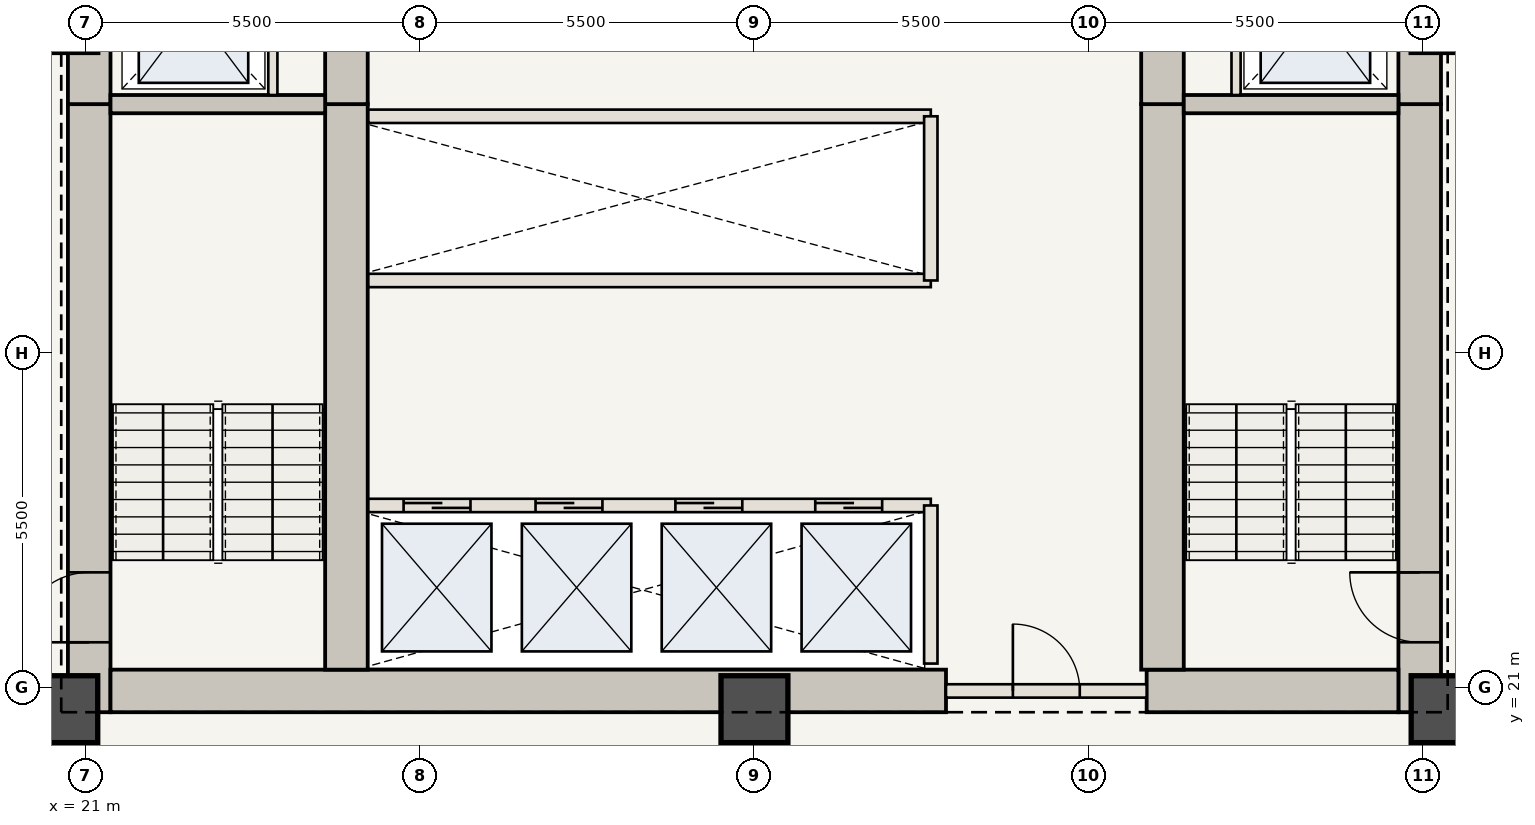
"""IFC4 building model, lengths in metres.
Left out: names, types, materials, properties, quantities, classifications, styles, units other than length and angle.
Written with IfcOpenShell. Run it as: python <this file> out.ifc"""

import sys

from ifc_helpers import new_model, si_unit, direction, frame, frame_2d, origin, origin_2d, place, context, subcontext, project, spatial, rectangle, extrude, element, fill, save


model = new_model("IFC4")
c1 = context("Model", 3, precision=1e-05, world=origin(), true_north=direction((0.0, 1.0)))
c2 = subcontext(c1, "Body", "Model", "MODEL_VIEW")
j1 = project(units=[si_unit("LENGTHUNIT", "METRE"), si_unit("PLANEANGLEUNIT", "RADIAN")], contexts=[c1])
p1 = place(None, origin())
s1 = spatial("IfcSite", under=j1, at=p1, CompositionType="ELEMENT")
p2 = place(p1, origin())
s2 = spatial("IfcBuilding", under=s1, at=p2, CompositionType="ELEMENT")
p3 = place(p2, frame((0.0, 0.0, 49.35)))
s3 = spatial("IfcBuildingStorey", under=s2, at=p3, CompositionType="ELEMENT", Elevation=49.35)
p4 = place(p3, frame((21.06, 20.6, 0.0), z_axis=(0.0, 0.0, 1.0), x_axis=(0.0, 1.0, 0.0)))
e1 = element("IfcWall", 1, at=p4, inside=s3, PredefinedType="SHEAR", context=c2, shape_type="SweptSolid", body=[
    extrude(rectangle(XDim=10.0, YDim=0.7, at=frame_2d((5.0, 0.0))), origin(), (0.0, 0.0, 1.0), 3.5),
])
p5 = place(p4, frame((1.15, 0.0, 0.0)))
e2 = element("IfcOpeningElement", 2, at=p5, cuts=e1, PredefinedType="OPENING", context=c2, shape_type="SweptSolid", body=[
    extrude(rectangle(XDim=1.15, YDim=2.15, at=frame_2d((0.575, 1.075))), frame((0.0, 0.36, 0.0), z_axis=(0.0, -1.0, 0.0), x_axis=(1.0, 0.0, 0.0)), (0.0, 0.0, 1.0), 0.72),
])
p6 = place(p3, frame((21.06, 30.6, 0.0), z_axis=(0.0, 0.0, 1.0), x_axis=(0.0, 1.0, 0.0)))
e3 = element("IfcWall", 3, at=p6, inside=s3, PredefinedType="SHEAR", context=c2, shape_type="SweptSolid", body=[
    extrude(rectangle(XDim=12.75, YDim=0.7, at=frame_2d((6.375, 0.0))), origin(), (0.0, 0.0, 1.0), 3.5),
])
p7 = place(p6, frame((4.2, 0.0, 0.0)))
e4 = element("IfcOpeningElement", 4, at=p7, cuts=e3, PredefinedType="OPENING", context=c2, shape_type="SweptSolid", body=[
    extrude(rectangle(XDim=1.1, YDim=2.15, at=frame_2d((0.55, 1.075))), frame((0.0, 0.36, 0.0), z_axis=(0.0, -1.0, 0.0), x_axis=(1.0, 0.0, 0.0)), (0.0, 0.0, 1.0), 0.72),
])
p8 = place(p6, frame((9.2, 0.0, 0.0)))
e5 = element("IfcOpeningElement", 5, at=p8, cuts=e3, PredefinedType="OPENING", context=c2, shape_type="SweptSolid", body=[
    extrude(rectangle(XDim=0.92, YDim=2.1, at=frame_2d((0.46, 1.05))), frame((0.0, 0.36, 0.0), z_axis=(0.0, -1.0, 0.0), x_axis=(1.0, 0.0, 0.0)), (0.0, 0.0, 1.0), 0.72),
])
p9 = place(p3, frame((42.94, 20.6, 0.0), z_axis=(0.0, 0.0, 1.0), x_axis=(0.0, 1.0, 0.0)))
e6 = element("IfcWall", 6, at=p9, inside=s3, PredefinedType="SHEAR", context=c2, shape_type="SweptSolid", body=[
    extrude(rectangle(XDim=10.0, YDim=0.7, at=frame_2d((5.0, 0.0))), origin(), (0.0, 0.0, 1.0), 3.5),
])
p10 = place(p9, frame((1.15, 0.0, 0.0)))
e7 = element("IfcOpeningElement", 7, at=p10, cuts=e6, PredefinedType="OPENING", context=c2, shape_type="SweptSolid", body=[
    extrude(rectangle(XDim=1.15, YDim=2.15, at=frame_2d((0.575, 1.075))), frame((0.0, 0.36, 0.0), z_axis=(0.0, -1.0, 0.0), x_axis=(1.0, 0.0, 0.0)), (0.0, 0.0, 1.0), 0.72),
])
p11 = place(p3, frame((42.94, 30.6, 0.0), z_axis=(0.0, 0.0, 1.0), x_axis=(0.0, 1.0, 0.0)))
e8 = element("IfcWall", 8, at=p11, inside=s3, PredefinedType="SHEAR", context=c2, shape_type="SweptSolid", body=[
    extrude(rectangle(XDim=12.75, YDim=0.7, at=frame_2d((6.375, 0.0))), origin(), (0.0, 0.0, 1.0), 3.5),
])
p12 = place(p11, frame((4.2, 0.0, 0.0)))
e9 = element("IfcOpeningElement", 9, at=p12, cuts=e8, PredefinedType="OPENING", context=c2, shape_type="SweptSolid", body=[
    extrude(rectangle(XDim=1.1, YDim=2.15, at=frame_2d((0.55, 1.075))), frame((0.0, 0.36, 0.0), z_axis=(0.0, -1.0, 0.0), x_axis=(1.0, 0.0, 0.0)), (0.0, 0.0, 1.0), 0.72),
])
p13 = place(p11, frame((8.05, 0.0, 0.0)))
e10 = element("IfcOpeningElement", 10, at=p13, cuts=e8, PredefinedType="OPENING", context=c2, shape_type="SweptSolid", body=[
    extrude(rectangle(XDim=0.88, YDim=2.1, at=frame_2d((0.44, 1.05))), frame((0.0, 0.36, 0.0), z_axis=(0.0, -1.0, 0.0), x_axis=(1.0, 0.0, 0.0)), (0.0, 0.0, 1.0), 0.72),
])
p14 = place(p11, frame((9.45, 0.0, 0.0)))
e11 = element("IfcOpeningElement", 11, at=p14, cuts=e8, PredefinedType="OPENING", context=c2, shape_type="SweptSolid", body=[
    extrude(rectangle(XDim=0.88, YDim=2.1, at=frame_2d((0.44, 1.05))), frame((0.0, 0.36, 0.0), z_axis=(0.0, -1.0, 0.0), x_axis=(1.0, 0.0, 0.0)), (0.0, 0.0, 1.0), 0.72),
])
p15 = place(p11, frame((10.85, 0.0, 0.0)))
e12 = element("IfcOpeningElement", 12, at=p15, cuts=e8, PredefinedType="OPENING", context=c2, shape_type="SweptSolid", body=[
    extrude(rectangle(XDim=0.88, YDim=2.1, at=frame_2d((0.44, 1.05))), frame((0.0, 0.36, 0.0), z_axis=(0.0, -1.0, 0.0), x_axis=(1.0, 0.0, 0.0)), (0.0, 0.0, 1.0), 0.72),
])
p16 = place(p3, frame((21.41, 20.95, 0.0), z_axis=(0.0, 0.0, 1.0), x_axis=(1.0, 0.0, 0.0)))
e13 = element("IfcWall", 13, at=p16, inside=s3, PredefinedType="SHEAR", context=c2, shape_type="SweptSolid", body=[
    extrude(rectangle(XDim=13.74, YDim=0.7, at=frame_2d((6.87, 0.0))), origin(), (0.0, 0.0, 1.0), 3.5),
])
p17 = place(p3, frame((38.45, 20.95, 0.0), z_axis=(0.0, 0.0, 1.0), x_axis=(1.0, 0.0, 0.0)))
e14 = element("IfcWall", 14, at=p17, inside=s3, PredefinedType="SHEAR", context=c2, shape_type="SweptSolid", body=[
    extrude(rectangle(XDim=4.14, YDim=0.7, at=frame_2d((2.07, 0.0))), origin(), (0.0, 0.0, 1.0), 3.5),
])
p18 = place(p3, frame((25.29, 21.3, 0.0), z_axis=(0.0, 0.0, 1.0), x_axis=(0.0, 1.0, 0.0)))
e15 = element("IfcWall", 15, at=p18, inside=s3, PredefinedType="SHEAR", context=c2, shape_type="SweptSolid", body=[
    extrude(rectangle(XDim=9.3, YDim=0.7, at=frame_2d((4.65, 0.0))), origin(), (0.0, 0.0, 1.0), 3.5),
])
p19 = place(p3, frame((25.29, 30.6, 0.0), z_axis=(0.0, 0.0, 1.0), x_axis=(0.0, 1.0, 0.0)))
e16 = element("IfcWall", 16, at=p19, inside=s3, PredefinedType="SHEAR", context=c2, shape_type="SweptSolid", body=[
    extrude(rectangle(XDim=12.05, YDim=0.7, at=frame_2d((6.025, 0.0))), origin(), (0.0, 0.0, 1.0), 3.5),
])
p20 = place(p19, frame((6.25, 0.0, 0.0)))
e17 = element("IfcOpeningElement", 17, at=p20, cuts=e16, PredefinedType="OPENING", context=c2, shape_type="SweptSolid", body=[
    extrude(rectangle(XDim=1.1, YDim=2.15, at=frame_2d((0.55, 1.075))), frame((0.0, 0.36, 0.0), z_axis=(0.0, -1.0, 0.0), x_axis=(1.0, 0.0, 0.0)), (0.0, 0.0, 1.0), 0.72),
])
p21 = place(p3, frame((38.71, 21.3, 0.0), z_axis=(0.0, 0.0, 1.0), x_axis=(0.0, 1.0, 0.0)))
e18 = element("IfcWall", 18, at=p21, inside=s3, PredefinedType="SHEAR", context=c2, shape_type="SweptSolid", body=[
    extrude(rectangle(XDim=9.3, YDim=0.7, at=frame_2d((4.65, 0.0))), origin(), (0.0, 0.0, 1.0), 3.5),
])
p22 = place(p3, frame((38.71, 30.6, 0.0), z_axis=(0.0, 0.0, 1.0), x_axis=(0.0, 1.0, 0.0)))
e19 = element("IfcWall", 19, at=p22, inside=s3, PredefinedType="SHEAR", context=c2, shape_type="SweptSolid", body=[
    extrude(rectangle(XDim=12.05, YDim=0.7, at=frame_2d((6.025, 0.0))), origin(), (0.0, 0.0, 1.0), 3.5),
])
for number, where, z_axis, x_axis in (
    (20, (20.65, 20.65, 0.0), (0.0, 0.0, 1.0), (1.0, 0.0, 0.0)),
    (21, (32.0, 20.65, 0.0), (0.0, 0.0, 1.0), (1.0, 0.0, 0.0)),
    (22, (43.35, 20.65, 0.0), (0.0, 0.0, 1.0), (1.0, 0.0, 0.0)),
):
    element("IfcColumn", number, at=place(p3, frame(where, z_axis=z_axis, x_axis=x_axis)), inside=s3, PredefinedType="COLUMN", context=c2, shape_type="SweptSolid", body=[
        extrude(rectangle(XDim=1.1, YDim=1.1, at=origin_2d()), origin(), (0.0, 0.0, 1.0), 3.5),
    ])
for number, where, z_axis, x_axis in (
    (23, (21.41, 30.6, 0.0), (0.0, 0.0, 1.0), (1.0, 0.0, 0.0)),
    (24, (39.06, 30.6, 0.0), (0.0, 0.0, 1.0), (1.0, 0.0, 0.0)),
):
    element("IfcWall", number, at=place(p3, frame(where, z_axis=z_axis, x_axis=x_axis)), inside=s3, PredefinedType="SHEAR", context=c2, shape_type="SweptSolid", body=[
        extrude(rectangle(XDim=3.53, YDim=0.3, at=frame_2d((1.765, 0.0))), origin(), (0.0, 0.0, 1.0), 3.32),
    ])
for number, where, z_axis, x_axis in (
    (25, (24.08, 30.75, 0.0), (0.0, 0.0, 1.0), (0.0, 1.0, 0.0)),
    (26, (39.92, 30.75, 0.0), (0.0, 0.0, 1.0), (0.0, 1.0, 0.0)),
):
    element("IfcWall", number, at=place(p3, frame(where, z_axis=z_axis, x_axis=x_axis)), inside=s3, PredefinedType="STANDARD", context=c2, shape_type="SweptSolid", body=[
        extrude(rectangle(XDim=2.65, YDim=0.15, at=frame_2d((1.325, 0.0))), origin(), (0.0, 0.0, 1.0), 3.32),
    ])
p23 = place(p3, frame((35.15, 20.95, 0.0), z_axis=(0.0, 0.0, 1.0), x_axis=(1.0, 0.0, 0.0)))
e27 = element("IfcWall", 27, at=p23, inside=s3, PredefinedType="STANDARD", context=c2, shape_type="SweptSolid", body=[
    extrude(rectangle(XDim=3.3, YDim=0.22, at=frame_2d((1.65, 0.0))), origin(), (0.0, 0.0, 1.0), 3.32),
])
p24 = place(p23, frame((1.1, 0.0, 0.0)))
e28 = element("IfcOpeningElement", 28, at=p24, cuts=e27, PredefinedType="OPENING", context=c2, shape_type="SweptSolid", body=[
    extrude(rectangle(XDim=1.1, YDim=2.15, at=frame_2d((0.55, 1.075))), frame((0.0, 0.12, 0.0), z_axis=(0.0, -1.0, 0.0), x_axis=(1.0, 0.0, 0.0)), (0.0, 0.0, 1.0), 0.24),
])
p25 = place(p3, frame((25.65, 24.0, 0.0), z_axis=(0.0, 0.0, 1.0), x_axis=(1.0, 0.0, 0.0)))
e29 = element("IfcWall", 29, at=p25, inside=s3, PredefinedType="STANDARD", context=c2, shape_type="SweptSolid", body=[
    extrude(rectangle(XDim=9.25, YDim=0.22, at=frame_2d((4.625, 0.0))), origin(), (0.0, 0.0, 1.0), 3.32),
])
p26 = place(p25, frame((0.58, 0.0, 0.0)))
e30 = element("IfcOpeningElement", 30, at=p26, cuts=e29, PredefinedType="OPENING", context=c2, shape_type="SweptSolid", body=[
    extrude(rectangle(XDim=1.1, YDim=2.15, at=frame_2d((0.55, 1.075))), frame((0.0, 0.12, 0.0), z_axis=(0.0, -1.0, 0.0), x_axis=(1.0, 0.0, 0.0)), (0.0, 0.0, 1.0), 0.24),
])
p27 = place(p25, frame((2.75, 0.0, 0.0)))
e31 = element("IfcOpeningElement", 31, at=p27, cuts=e29, PredefinedType="OPENING", context=c2, shape_type="SweptSolid", body=[
    extrude(rectangle(XDim=1.1, YDim=2.15, at=frame_2d((0.55, 1.075))), frame((0.0, 0.12, 0.0), z_axis=(0.0, -1.0, 0.0), x_axis=(1.0, 0.0, 0.0)), (0.0, 0.0, 1.0), 0.24),
])
p28 = place(p25, frame((5.05, 0.0, 0.0)))
e32 = element("IfcOpeningElement", 32, at=p28, cuts=e29, PredefinedType="OPENING", context=c2, shape_type="SweptSolid", body=[
    extrude(rectangle(XDim=1.1, YDim=2.15, at=frame_2d((0.55, 1.075))), frame((0.0, 0.12, 0.0), z_axis=(0.0, -1.0, 0.0), x_axis=(1.0, 0.0, 0.0)), (0.0, 0.0, 1.0), 0.24),
])
p29 = place(p25, frame((7.35, 0.0, 0.0)))
e33 = element("IfcOpeningElement", 33, at=p29, cuts=e29, PredefinedType="OPENING", context=c2, shape_type="SweptSolid", body=[
    extrude(rectangle(XDim=1.1, YDim=2.15, at=frame_2d((0.55, 1.075))), frame((0.0, 0.12, 0.0), z_axis=(0.0, -1.0, 0.0), x_axis=(1.0, 0.0, 0.0)), (0.0, 0.0, 1.0), 0.24),
])
p30 = place(p3, frame((34.9, 21.4, 0.0), z_axis=(0.0, 0.0, 1.0), x_axis=(0.0, 1.0, 0.0)))
e34 = element("IfcWall", 34, at=p30, inside=s3, PredefinedType="STANDARD", context=c2, shape_type="SweptSolid", body=[
    extrude(rectangle(XDim=2.6, YDim=0.22, at=frame_2d((1.3, 0.0))), origin(), (0.0, 0.0, 1.0), 3.32),
])
for number, where, z_axis, x_axis in (
    (35, (25.65, 27.7, 0.0), (0.0, 0.0, 1.0), (1.0, 0.0, 0.0)),
    (36, (25.65, 30.4, 0.0), (0.0, 0.0, 1.0), (1.0, 0.0, 0.0)),
):
    element("IfcWall", number, at=place(p3, frame(where, z_axis=z_axis, x_axis=x_axis)), inside=s3, PredefinedType="STANDARD", context=c2, shape_type="SweptSolid", body=[
        extrude(rectangle(XDim=9.25, YDim=0.22, at=frame_2d((4.625, 0.0))), origin(), (0.0, 0.0, 1.0), 3.32),
    ])
p31 = place(p3, frame((34.9, 27.7, 0.0), z_axis=(0.0, 0.0, 1.0), x_axis=(0.0, 1.0, 0.0)))
e37 = element("IfcWall", 37, at=p31, inside=s3, PredefinedType="STANDARD", context=c2, shape_type="SweptSolid", body=[
    extrude(rectangle(XDim=2.7, YDim=0.22, at=frame_2d((1.35, 0.0))), origin(), (0.0, 0.0, 1.0), 3.32),
])
p32 = place(p5, origin())
e38 = element("IfcDoor", 38, at=p32, inside=s3, OperationType="SINGLE_SWING_LEFT", PredefinedType="DOOR", context=c2, shape_type="SweptSolid", body=[
    extrude(rectangle(XDim=1.15, YDim=2.15, at=frame_2d((0.575, 1.075))), frame((0.0, 0.025, 0.0), z_axis=(0.0, -1.0, 0.0), x_axis=(1.0, 0.0, 0.0)), (0.0, 0.0, 1.0), 0.05),
])
fill(e2, e38)
p33 = place(p10, origin())
e39 = element("IfcDoor", 39, at=p33, inside=s3, OperationType="SINGLE_SWING_RIGHT", PredefinedType="DOOR", context=c2, shape_type="SweptSolid", body=[
    extrude(rectangle(XDim=1.15, YDim=2.15, at=frame_2d((0.575, 1.075))), frame((0.0, 0.025, 0.0), z_axis=(0.0, -1.0, 0.0), x_axis=(1.0, 0.0, 0.0)), (0.0, 0.0, 1.0), 0.05),
])
fill(e7, e39)
p34 = place(p24, origin())
e40 = element("IfcDoor", 40, at=p34, inside=s3, OperationType="SINGLE_SWING_LEFT", PredefinedType="DOOR", context=c2, shape_type="SweptSolid", body=[
    extrude(rectangle(XDim=1.1, YDim=2.15, at=frame_2d((0.55, 1.075))), frame((0.0, 0.025, 0.0), z_axis=(0.0, -1.0, 0.0), x_axis=(1.0, 0.0, 0.0)), (0.0, 0.0, 1.0), 0.05),
])
fill(e28, e40)
p35 = place(p26, origin())
e41 = element("IfcDoor", 41, at=p35, inside=s3, OperationType="DOUBLE_DOOR_SLIDING", PredefinedType="DOOR", context=c2, shape_type="SweptSolid", body=[
    extrude(rectangle(XDim=1.1, YDim=2.15, at=frame_2d((0.55, 1.075))), frame((0.0, 0.025, 0.0), z_axis=(0.0, -1.0, 0.0), x_axis=(1.0, 0.0, 0.0)), (0.0, 0.0, 1.0), 0.05),
])
fill(e30, e41)
p36 = place(p27, origin())
e42 = element("IfcDoor", 42, at=p36, inside=s3, OperationType="DOUBLE_DOOR_SLIDING", PredefinedType="DOOR", context=c2, shape_type="SweptSolid", body=[
    extrude(rectangle(XDim=1.1, YDim=2.15, at=frame_2d((0.55, 1.075))), frame((0.0, 0.025, 0.0), z_axis=(0.0, -1.0, 0.0), x_axis=(1.0, 0.0, 0.0)), (0.0, 0.0, 1.0), 0.05),
])
fill(e31, e42)
p37 = place(p28, origin())
e43 = element("IfcDoor", 43, at=p37, inside=s3, OperationType="DOUBLE_DOOR_SLIDING", PredefinedType="DOOR", context=c2, shape_type="SweptSolid", body=[
    extrude(rectangle(XDim=1.1, YDim=2.15, at=frame_2d((0.55, 1.075))), frame((0.0, 0.025, 0.0), z_axis=(0.0, -1.0, 0.0), x_axis=(1.0, 0.0, 0.0)), (0.0, 0.0, 1.0), 0.05),
])
fill(e32, e43)
p38 = place(p29, origin())
e44 = element("IfcDoor", 44, at=p38, inside=s3, OperationType="DOUBLE_DOOR_SLIDING", PredefinedType="DOOR", context=c2, shape_type="SweptSolid", body=[
    extrude(rectangle(XDim=1.1, YDim=2.15, at=frame_2d((0.55, 1.075))), frame((0.0, 0.025, 0.0), z_axis=(0.0, -1.0, 0.0), x_axis=(1.0, 0.0, 0.0)), (0.0, 0.0, 1.0), 0.05),
])
fill(e33, e44)
save(model, sys.argv[1])
